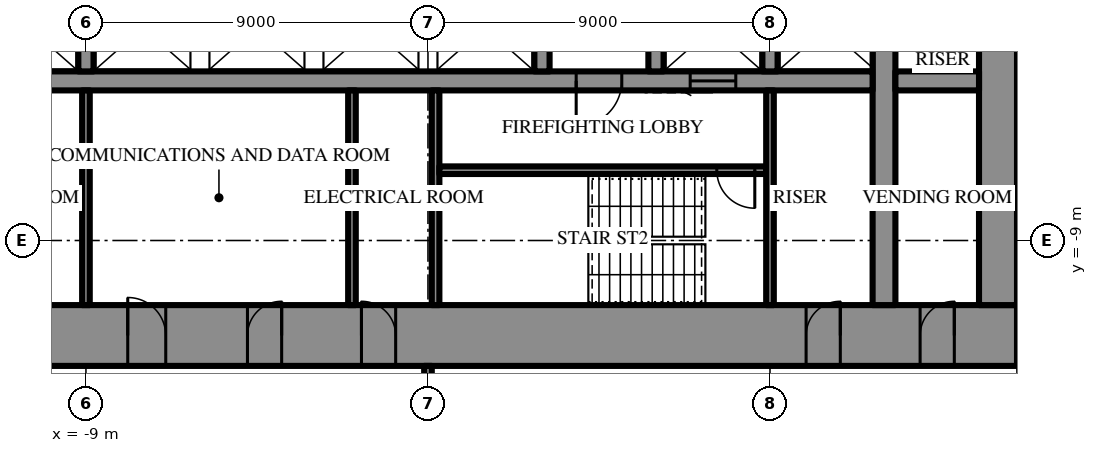
"""IFC4 building model, lengths in metres.
Left out: names, types, materials, properties, quantities, classifications, styles, units other than length and angle.
Written with IfcOpenShell. Run it as: python <this file> out.ifc"""

import sys

from ifc_helpers import new_model, si_unit, direction, frame, frame_2d, origin, place, context, subcontext, project, spatial, rectangle, extrude, element, fill, save


model = new_model("IFC4")
c1 = context("Model", 3, precision=1e-05, world=origin(), true_north=direction((0.0, 1.0)))
c2 = subcontext(c1, "Body", "Model", "MODEL_VIEW")
j1 = project(units=[si_unit("LENGTHUNIT", "METRE"), si_unit("PLANEANGLEUNIT", "RADIAN")], contexts=[c1])
p1 = place(None, origin())
s1 = spatial("IfcSite", under=j1, at=p1, CompositionType="ELEMENT")
p2 = place(p1, origin())
s2 = spatial("IfcBuilding", under=s1, at=p2, CompositionType="ELEMENT")
p3 = place(p2, frame((0.0, 0.0, 278.5)))
s3 = spatial("IfcBuildingStorey", under=s2, at=p3, CompositionType="ELEMENT", Elevation=278.5)
p4 = place(p3, frame((15.5, -11.5, 0.0), z_axis=(0.0, 0.0, 1.0), x_axis=(-1.0, 0.0, 0.0)))
e1 = element("IfcWall", 1, at=p4, inside=s3, PredefinedType="SHEAR", context=c2, shape_type="SweptSolid", body=[
    extrude(rectangle(XDim=31.0, YDim=1.6, at=frame_2d((15.5, 0.0))), origin(), (0.0, 0.0, 1.0), 4.2),
])
p5 = place(p4, frame((16.35, 0.0, 0.0)))
e2 = element("IfcOpeningElement", 2, at=p5, cuts=e1, PredefinedType="OPENING", context=c2, shape_type="SweptSolid", body=[
    extrude(rectangle(XDim=0.9, YDim=2.2, at=frame_2d((0.45, 1.1))), frame((0.0, 0.81, 0.0), z_axis=(0.0, -1.0, 0.0), x_axis=(1.0, 0.0, 0.0)), (0.0, 0.0, 1.0), 1.62),
])
p6 = place(p4, frame((19.35, 0.0, 0.0)))
e3 = element("IfcOpeningElement", 3, at=p6, cuts=e1, PredefinedType="OPENING", context=c2, shape_type="SweptSolid", body=[
    extrude(rectangle(XDim=0.9, YDim=2.2, at=frame_2d((0.45, 1.1))), frame((0.0, 0.81, 0.0), z_axis=(0.0, -1.0, 0.0), x_axis=(1.0, 0.0, 0.0)), (0.0, 0.0, 1.0), 1.62),
])
p7 = place(p4, frame((22.4, 0.0, 0.0)))
e4 = element("IfcOpeningElement", 4, at=p7, cuts=e1, PredefinedType="OPENING", context=c2, shape_type="SweptSolid", body=[
    extrude(rectangle(XDim=1.0, YDim=2.2, at=frame_2d((0.5, 1.1))), frame((0.0, 0.81, 0.0), z_axis=(0.0, -1.0, 0.0), x_axis=(1.0, 0.0, 0.0)), (0.0, 0.0, 1.0), 1.62),
])
p8 = place(p4, frame((1.65, 0.0, 0.0)))
e5 = element("IfcOpeningElement", 5, at=p8, cuts=e1, PredefinedType="OPENING", context=c2, shape_type="SweptSolid", body=[
    extrude(rectangle(XDim=0.9, YDim=2.2, at=frame_2d((0.45, 1.1))), frame((0.0, 0.81, 0.0), z_axis=(0.0, -1.0, 0.0), x_axis=(1.0, 0.0, 0.0)), (0.0, 0.0, 1.0), 1.62),
])
p9 = place(p4, frame((4.65, 0.0, 0.0)))
e6 = element("IfcOpeningElement", 6, at=p9, cuts=e1, PredefinedType="OPENING", context=c2, shape_type="SweptSolid", body=[
    extrude(rectangle(XDim=0.9, YDim=2.2, at=frame_2d((0.45, 1.1))), frame((0.0, 0.81, 0.0), z_axis=(0.0, -1.0, 0.0), x_axis=(1.0, 0.0, 0.0)), (0.0, 0.0, 1.0), 1.62),
])
p10 = place(p4, frame((25.45, 0.0, 0.0)))
e7 = element("IfcOpeningElement", 7, at=p10, cuts=e1, PredefinedType="OPENING", context=c2, shape_type="SweptSolid", body=[
    extrude(rectangle(XDim=0.9, YDim=2.2, at=frame_2d((0.45, 1.1))), frame((0.0, 0.81, 0.0), z_axis=(0.0, -1.0, 0.0), x_axis=(1.0, 0.0, 0.0)), (0.0, 0.0, 1.0), 1.62),
])
p11 = place(p4, frame((28.45, 0.0, 0.0)))
e8 = element("IfcOpeningElement", 8, at=p11, cuts=e1, PredefinedType="OPENING", context=c2, shape_type="SweptSolid", body=[
    extrude(rectangle(XDim=0.9, YDim=2.2, at=frame_2d((0.45, 1.1))), frame((0.0, 0.81, 0.0), z_axis=(0.0, -1.0, 0.0), x_axis=(1.0, 0.0, 0.0)), (0.0, 0.0, 1.0), 1.62),
])
p12 = place(p3, frame((15.0, -10.7, 0.0), z_axis=(0.0, 0.0, 1.0), x_axis=(0.0, 1.0, 0.0)))
e9 = element("IfcWall", 9, at=p12, inside=s3, PredefinedType="SHEAR", context=c2, shape_type="SweptSolid", body=[
    extrude(rectangle(XDim=21.4, YDim=1.0, at=frame_2d((10.7, 0.0))), origin(), (0.0, 0.0, 1.0), 4.2),
])
p13 = place(p12, frame((9.8, 0.0, 0.0)))
e10 = element("IfcOpeningElement", 10, at=p13, cuts=e9, PredefinedType="OPENING", context=c2, shape_type="SweptSolid", body=[
    extrude(rectangle(XDim=1.8, YDim=2.4, at=frame_2d((0.9, 1.2))), frame((0.0, 0.51, 0.0), z_axis=(0.0, -1.0, 0.0), x_axis=(1.0, 0.0, 0.0)), (0.0, 0.0, 1.0), 1.02),
])
p14 = place(p3, frame((12.0, -10.7, 0.0), z_axis=(0.0, 0.0, 1.0), x_axis=(0.0, 1.0, 0.0)))
e11 = element("IfcWall", 11, at=p14, inside=s3, PredefinedType="SHEAR", context=c2, shape_type="SweptSolid", body=[
    extrude(rectangle(XDim=21.4, YDim=0.6, at=frame_2d((10.7, 0.0))), origin(), (0.0, 0.0, 1.0), 4.2),
])
p15 = place(p14, frame((9.8, 0.0, 0.0)))
e12 = element("IfcOpeningElement", 12, at=p15, cuts=e11, PredefinedType="OPENING", context=c2, shape_type="SweptSolid", body=[
    extrude(rectangle(XDim=1.8, YDim=2.4, at=frame_2d((0.9, 1.2))), frame((0.0, 0.31, 0.0), z_axis=(0.0, -1.0, 0.0), x_axis=(1.0, 0.0, 0.0)), (0.0, 0.0, 1.0), 0.62),
])
p16 = place(p3, frame((14.5, -4.8, 0.0), z_axis=(0.0, 0.0, 1.0), x_axis=(-1.0, 0.0, 0.0)))
e13 = element("IfcWall", 13, at=p16, inside=s3, PredefinedType="SHEAR", context=c2, shape_type="SweptSolid", body=[
    extrude(rectangle(XDim=2.2, YDim=0.5, at=frame_2d((1.1, 0.0))), origin(), (0.0, 0.0, 1.0), 4.2),
])
p17 = place(p3, frame((11.7, -4.8, 0.0), z_axis=(0.0, 0.0, 1.0), x_axis=(-1.0, 0.0, 0.0)))
e14 = element("IfcWall", 14, at=p17, inside=s3, PredefinedType="SHEAR", context=c2, shape_type="SweptSolid", body=[
    extrude(rectangle(XDim=23.4, YDim=0.5, at=frame_2d((11.7, 0.0))), origin(), (0.0, 0.0, 1.0), 4.2),
])
p18 = place(p17, frame((6.6, 0.0, 0.0)))
e15 = element("IfcOpeningElement", 15, at=p18, cuts=e14, PredefinedType="OPENING", context=c2, shape_type="SweptSolid", body=[
    extrude(rectangle(XDim=1.2, YDim=2.2, at=frame_2d((0.6, 1.1))), frame((0.0, 0.26, 0.0), z_axis=(0.0, -1.0, 0.0), x_axis=(1.0, 0.0, 0.0)), (0.0, 0.0, 1.0), 0.52),
])
p19 = place(p17, frame((3.6, 0.0, 0.0)))
e16 = element("IfcOpeningElement", 16, at=p19, cuts=e14, PredefinedType="OPENING", context=c2, shape_type="SweptSolid", body=[
    extrude(rectangle(XDim=1.2, YDim=2.2, at=frame_2d((0.6, 1.1))), frame((0.0, 0.26, 0.0), z_axis=(0.0, -1.0, 0.0), x_axis=(1.0, 0.0, 0.0)), (0.0, 0.0, 1.0), 0.52),
])
for number, where, z_axis, x_axis in (
    (17, (9.0, -2.25, 0.0), (0.0, 0.0, 1.0), (0.0, -1.0, 0.0)),
    (18, (6.0, -2.25, 0.0), (0.0, 0.0, 1.0), (0.0, -1.0, 0.0)),
    (19, (3.0, -2.25, 0.0), (0.0, 0.0, 1.0), (0.0, -1.0, 0.0)),
    (20, (-9.0, -2.25, 0.0), (0.0, 0.0, 1.0), (0.0, -1.0, 0.0)),
):
    element("IfcWall", number, at=place(p3, frame(where, z_axis=z_axis, x_axis=x_axis)), inside=s3, PredefinedType="SHEAR", context=c2, shape_type="SweptSolid", body=[
        extrude(rectangle(XDim=2.3, YDim=0.4, at=frame_2d((1.15, 0.0))), origin(), (0.0, 0.0, 1.0), 4.2),
    ])
p20 = place(p3, frame((0.2, -5.05, 0.0), z_axis=(0.0, 0.0, 1.0), x_axis=(0.0, -1.0, 0.0)))
e21 = element("IfcWall", 21, at=p20, inside=s3, PredefinedType="SHEAR", context=c2, shape_type="SweptSolid", body=[
    extrude(rectangle(XDim=5.65, YDim=0.2, at=frame_2d((2.825, 0.0))), origin(), (0.0, 0.0, 1.0), 4.2),
])
p21 = place(p3, frame((8.9, -7.15, 0.0), z_axis=(0.0, 0.0, 1.0), x_axis=(-1.0, 0.0, 0.0)))
e22 = element("IfcWall", 22, at=p21, inside=s3, PredefinedType="SHEAR", context=c2, shape_type="SweptSolid", body=[
    extrude(rectangle(XDim=8.6, YDim=0.2, at=frame_2d((4.3, 0.0))), origin(), (0.0, 0.0, 1.0), 4.2),
])
p22 = place(p21, frame((0.3, 0.0, 0.0)))
e23 = element("IfcOpeningElement", 23, at=p22, cuts=e22, PredefinedType="OPENING", context=c2, shape_type="SweptSolid", body=[
    extrude(rectangle(XDim=1.0, YDim=2.2, at=frame_2d((0.5, 1.1))), frame((0.0, 0.11, 0.0), z_axis=(0.0, -1.0, 0.0), x_axis=(1.0, 0.0, 0.0)), (0.0, 0.0, 1.0), 0.22),
])
for number, where, z_axis, x_axis in (
    (24, (9.0, -5.05, 0.0), (0.0, 0.0, 1.0), (0.0, -1.0, 0.0)),
    (25, (-9.0, -5.05, 0.0), (0.0, 0.0, 1.0), (0.0, -1.0, 0.0)),
    (26, (-2.0, -5.05, 0.0), (0.0, 0.0, 1.0), (0.0, -1.0, 0.0)),
):
    element("IfcWall", number, at=place(p3, frame(where, z_axis=z_axis, x_axis=x_axis)), inside=s3, PredefinedType="PARTITIONING", context=c2, shape_type="SweptSolid", body=[
        extrude(rectangle(XDim=5.65, YDim=0.2, at=frame_2d((2.825, 0.0))), origin(), (0.0, 0.0, 1.0), 4.0),
    ])
p23 = place(p3, frame((0.0, -12.3, 0.0), z_axis=(0.0, 0.0, 1.0), x_axis=(0.0, -1.0, 0.0)))
e27 = element("IfcWall", 27, at=p23, inside=s3, PredefinedType="PARTITIONING", context=c2, shape_type="SweptSolid", body=[
    extrude(rectangle(XDim=15.55, YDim=0.2, at=frame_2d((7.775, 0.0))), origin(), (0.0, 0.0, 1.0), 2.992),
])
p24 = place(p23, frame((1.055, 0.0, 0.0)))
e28 = element("IfcOpeningElement", 28, at=p24, cuts=e27, PredefinedType="OPENING", context=c2, shape_type="SweptSolid", body=[
    extrude(rectangle(XDim=1.0, YDim=2.2, at=frame_2d((0.5, 1.1))), frame((0.0, 0.11, 0.0), z_axis=(0.0, -1.0, 0.0), x_axis=(1.0, 0.0, 0.0)), (0.0, 0.0, 1.0), 0.22),
])
p25 = place(p18, origin())
e29 = element("IfcDoor", 29, at=p25, inside=s3, OperationType="SINGLE_SWING_LEFT", PredefinedType="DOOR", context=c2, shape_type="SweptSolid", body=[
    extrude(rectangle(XDim=1.2, YDim=2.2, at=frame_2d((0.6, 1.1))), frame((0.0, 0.025, 0.0), z_axis=(0.0, -1.0, 0.0), x_axis=(1.0, 0.0, 0.0)), (0.0, 0.0, 1.0), 0.05),
])
fill(e15, e29)
p26 = place(p22, origin())
e30 = element("IfcDoor", 30, at=p26, inside=s3, OperationType="SINGLE_SWING_RIGHT", PredefinedType="DOOR", context=c2, shape_type="SweptSolid", body=[
    extrude(rectangle(XDim=1.0, YDim=2.2, at=frame_2d((0.5, 1.1))), frame((0.0, 0.025, 0.0), z_axis=(0.0, -1.0, 0.0), x_axis=(1.0, 0.0, 0.0)), (0.0, 0.0, 1.0), 0.05),
])
fill(e23, e30)
p27 = place(p5, frame((0.9, 0.0, 0.0), z_axis=(0.0, 0.0, 1.0), x_axis=(-1.0, 0.0, 0.0)))
e31 = element("IfcDoor", 31, at=p27, inside=s3, OperationType="SINGLE_SWING_RIGHT", PredefinedType="DOOR", context=c2, shape_type="SweptSolid", body=[
    extrude(rectangle(XDim=0.9, YDim=2.2, at=frame_2d((0.45, 1.1))), frame((0.0, 0.025, 0.0), z_axis=(0.0, -1.0, 0.0), x_axis=(1.0, 0.0, 0.0)), (0.0, 0.0, 1.0), 0.05),
])
fill(e2, e31)
p28 = place(p6, frame((0.9, 0.0, 0.0), z_axis=(0.0, 0.0, 1.0), x_axis=(-1.0, 0.0, 0.0)))
e32 = element("IfcDoor", 32, at=p28, inside=s3, OperationType="SINGLE_SWING_LEFT", PredefinedType="DOOR", context=c2, shape_type="SweptSolid", body=[
    extrude(rectangle(XDim=0.9, YDim=2.2, at=frame_2d((0.45, 1.1))), frame((0.0, 0.025, 0.0), z_axis=(0.0, -1.0, 0.0), x_axis=(1.0, 0.0, 0.0)), (0.0, 0.0, 1.0), 0.05),
])
fill(e3, e32)
p29 = place(p7, frame((1.0, 0.0, 0.0), z_axis=(0.0, 0.0, 1.0), x_axis=(-1.0, 0.0, 0.0)))
e33 = element("IfcDoor", 33, at=p29, inside=s3, OperationType="SINGLE_SWING_RIGHT", PredefinedType="DOOR", context=c2, shape_type="SweptSolid", body=[
    extrude(rectangle(XDim=1.0, YDim=2.2, at=frame_2d((0.5, 1.1))), frame((0.0, 0.025, 0.0), z_axis=(0.0, -1.0, 0.0), x_axis=(1.0, 0.0, 0.0)), (0.0, 0.0, 1.0), 0.05),
])
fill(e4, e33)
p30 = place(p8, frame((0.9, 0.0, 0.0), z_axis=(0.0, 0.0, 1.0), x_axis=(-1.0, 0.0, 0.0)))
e34 = element("IfcDoor", 34, at=p30, inside=s3, OperationType="SINGLE_SWING_LEFT", PredefinedType="DOOR", context=c2, shape_type="SweptSolid", body=[
    extrude(rectangle(XDim=0.9, YDim=2.2, at=frame_2d((0.45, 1.1))), frame((0.0, 0.025, 0.0), z_axis=(0.0, -1.0, 0.0), x_axis=(1.0, 0.0, 0.0)), (0.0, 0.0, 1.0), 0.05),
])
fill(e5, e34)
p31 = place(p9, frame((0.9, 0.0, 0.0), z_axis=(0.0, 0.0, 1.0), x_axis=(-1.0, 0.0, 0.0)))
e35 = element("IfcDoor", 35, at=p31, inside=s3, OperationType="SINGLE_SWING_LEFT", PredefinedType="DOOR", context=c2, shape_type="SweptSolid", body=[
    extrude(rectangle(XDim=0.9, YDim=2.2, at=frame_2d((0.45, 1.1))), frame((0.0, 0.025, 0.0), z_axis=(0.0, -1.0, 0.0), x_axis=(1.0, 0.0, 0.0)), (0.0, 0.0, 1.0), 0.05),
])
fill(e6, e35)
p32 = place(p19, origin())
e36 = element("IfcDoor", 36, at=p32, inside=s3, OperationType="SLIDING_TO_LEFT", PredefinedType="DOOR", context=c2, shape_type="SweptSolid", body=[
    extrude(rectangle(XDim=1.2, YDim=2.2, at=frame_2d((0.6, 1.1))), frame((0.0, 0.025, 0.0), z_axis=(0.0, -1.0, 0.0), x_axis=(1.0, 0.0, 0.0)), (0.0, 0.0, 1.0), 0.05),
])
fill(e16, e36)
save(model, sys.argv[1])
